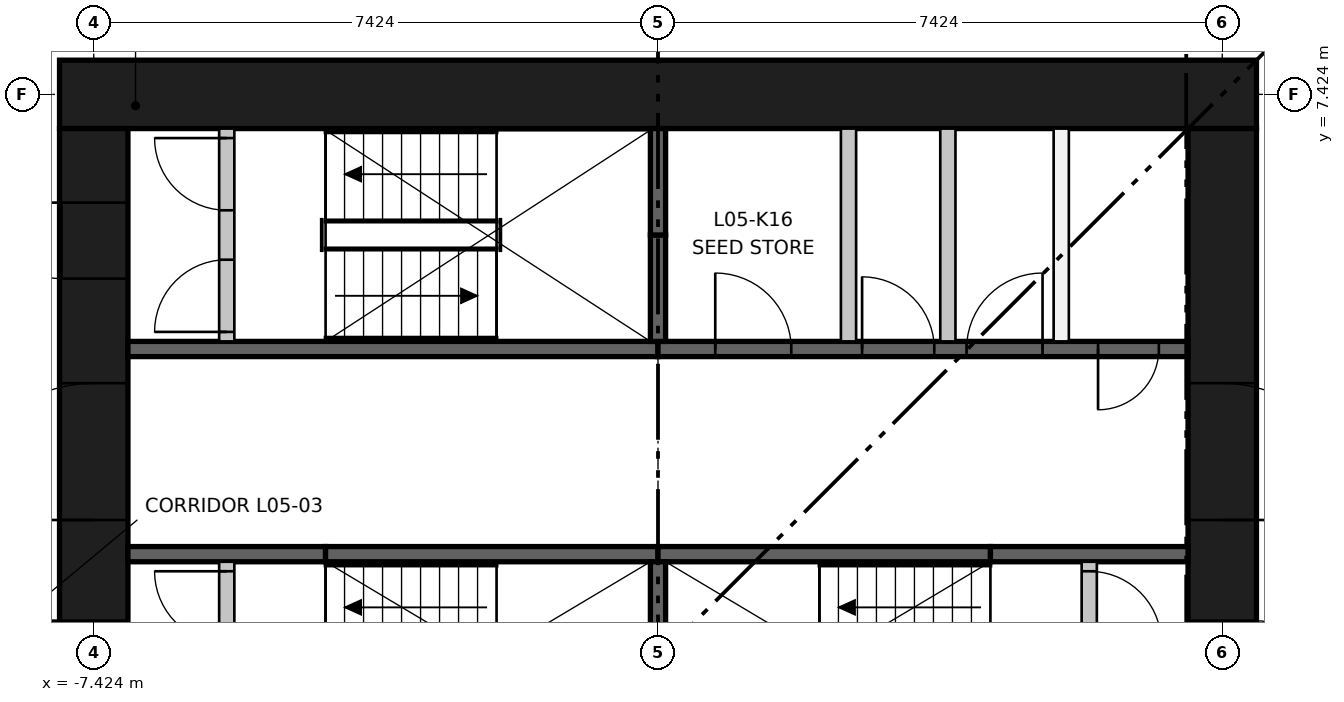
"""IFC4 building model, lengths in metres.
Left out: names, types, materials, properties, quantities, classifications, styles, units other than length and angle.
Written with IfcOpenShell. Run it as: python <this file> out.ifc"""

import sys

from ifc_helpers import new_model, si_unit, direction, frame, frame_2d, origin, place, context, subcontext, project, spatial, rectangle, extrude, element, fill, save


model = new_model("IFC4")
c1 = context("Model", 3, precision=1e-05, world=origin(), true_north=direction((0.0, 1.0)))
c2 = subcontext(c1, "Body", "Model", "MODEL_VIEW")
j1 = project(units=[si_unit("LENGTHUNIT", "METRE"), si_unit("PLANEANGLEUNIT", "RADIAN")], contexts=[c1])
p1 = place(None, origin())
s1 = spatial("IfcSite", under=j1, at=p1, CompositionType="ELEMENT")
p2 = place(p1, origin())
s2 = spatial("IfcBuilding", under=s1, at=p2, CompositionType="ELEMENT")
p3 = place(p2, frame((0.0, 0.0, 22.4)))
s3 = spatial("IfcBuildingStorey", under=s2, at=p3, CompositionType="ELEMENT", Elevation=22.4)
p4 = place(p3, frame((-7.874, 7.424, 0.0), z_axis=(0.0, 0.0, 1.0), x_axis=(1.0, 0.0, 0.0)))
e1 = element("IfcWall", 1, at=p4, inside=s3, PredefinedType="SHEAR", context=c2, shape_type="SweptSolid", body=[
    extrude(rectangle(XDim=15.748, YDim=0.9, at=frame_2d((7.874, 0.0))), origin(), (0.0, 0.0, 1.0), 3.8),
])
p5 = place(p3, frame((-7.424, -6.974, 0.0), z_axis=(0.0, 0.0, 1.0), x_axis=(0.0, 1.0, 0.0)))
e2 = element("IfcWall", 2, at=p5, inside=s3, PredefinedType="SHEAR", context=c2, shape_type="SweptSolid", body=[
    extrude(rectangle(XDim=13.948, YDim=0.9, at=frame_2d((6.974, 0.0))), origin(), (0.0, 0.0, 1.0), 3.8),
])
p6 = place(p5, frame((6.474, 0.0, 0.0)))
e3 = element("IfcOpeningElement", 3, at=p6, cuts=e2, PredefinedType="OPENING", context=c2, shape_type="SweptSolid", body=[
    extrude(rectangle(XDim=1.0, YDim=2.1, at=frame_2d((0.5, 1.05))), frame((0.0, 0.46, 0.0), z_axis=(0.0, -1.0, 0.0), x_axis=(1.0, 0.0, 0.0)), (0.0, 0.0, 1.0), 0.92),
])
p7 = place(p5, frame((3.35, 0.0, 0.0)))
e4 = element("IfcOpeningElement", 4, at=p7, cuts=e2, PredefinedType="OPENING", context=c2, shape_type="SweptSolid", body=[
    extrude(rectangle(XDim=1.8, YDim=2.1, at=frame_2d((0.9, 1.05))), frame((0.0, 0.46, 0.0), z_axis=(0.0, -1.0, 0.0), x_axis=(1.0, 0.0, 0.0)), (0.0, 0.0, 1.0), 0.92),
])
p8 = place(p5, frame((8.799, 0.0, 0.0)))
e5 = element("IfcOpeningElement", 5, at=p8, cuts=e2, PredefinedType="OPENING", context=c2, shape_type="SweptSolid", body=[
    extrude(rectangle(XDim=1.8, YDim=2.1, at=frame_2d((0.9, 1.05))), frame((0.0, 0.46, 0.0), z_axis=(0.0, -1.0, 0.0), x_axis=(1.0, 0.0, 0.0)), (0.0, 0.0, 1.0), 0.92),
])
p9 = place(p5, frame((11.974, 0.0, 0.0)))
e6 = element("IfcOpeningElement", 6, at=p9, cuts=e2, PredefinedType="OPENING", context=c2, shape_type="SweptSolid", body=[
    extrude(rectangle(XDim=1.0, YDim=2.1, at=frame_2d((0.5, 1.05))), frame((0.0, 0.46, 0.0), z_axis=(0.0, -1.0, 0.0), x_axis=(1.0, 0.0, 0.0)), (0.0, 0.0, 1.0), 0.92),
])
p10 = place(p3, frame((7.424, -6.974, 0.0), z_axis=(0.0, 0.0, 1.0), x_axis=(0.0, 1.0, 0.0)))
e7 = element("IfcWall", 7, at=p10, inside=s3, PredefinedType="SHEAR", context=c2, shape_type="SweptSolid", body=[
    extrude(rectangle(XDim=13.948, YDim=0.9, at=frame_2d((6.974, 0.0))), origin(), (0.0, 0.0, 1.0), 3.8),
])
p11 = place(p10, frame((6.474, 0.0, 0.0)))
e8 = element("IfcOpeningElement", 8, at=p11, cuts=e7, PredefinedType="OPENING", context=c2, shape_type="SweptSolid", body=[
    extrude(rectangle(XDim=1.0, YDim=2.1, at=frame_2d((0.5, 1.05))), frame((0.0, 0.46, 0.0), z_axis=(0.0, -1.0, 0.0), x_axis=(1.0, 0.0, 0.0)), (0.0, 0.0, 1.0), 0.92),
])
p12 = place(p10, frame((3.35, 0.0, 0.0)))
e9 = element("IfcOpeningElement", 9, at=p12, cuts=e7, PredefinedType="OPENING", context=c2, shape_type="SweptSolid", body=[
    extrude(rectangle(XDim=1.8, YDim=2.1, at=frame_2d((0.9, 1.05))), frame((0.0, 0.46, 0.0), z_axis=(0.0, -1.0, 0.0), x_axis=(1.0, 0.0, 0.0)), (0.0, 0.0, 1.0), 0.92),
])
p13 = place(p10, frame((8.799, 0.0, 0.0)))
e10 = element("IfcOpeningElement", 10, at=p13, cuts=e7, PredefinedType="OPENING", context=c2, shape_type="SweptSolid", body=[
    extrude(rectangle(XDim=1.8, YDim=2.1, at=frame_2d((0.9, 1.05))), frame((0.0, 0.46, 0.0), z_axis=(0.0, -1.0, 0.0), x_axis=(1.0, 0.0, 0.0)), (0.0, 0.0, 1.0), 0.92),
])
p14 = place(p3, frame((-6.974, 4.074, 0.0), z_axis=(0.0, 0.0, 1.0), x_axis=(1.0, 0.0, 0.0)))
e11 = element("IfcWall", 11, at=p14, inside=s3, PredefinedType="SHEAR", context=c2, shape_type="SweptSolid", body=[
    extrude(rectangle(XDim=6.974, YDim=0.2, at=frame_2d((3.487, 0.0))), origin(), (0.0, 0.0, 1.0), 3.45),
])
p15 = place(p3, frame((0.0, 4.074, 0.0), z_axis=(0.0, 0.0, 1.0), x_axis=(1.0, 0.0, 0.0)))
e12 = element("IfcWall", 12, at=p15, inside=s3, PredefinedType="SHEAR", context=c2, shape_type="SweptSolid", body=[
    extrude(rectangle(XDim=6.974, YDim=0.2, at=frame_2d((3.487, 0.0))), origin(), (0.0, 0.0, 1.0), 3.45),
])
p16 = place(p15, frame((0.753, 0.0, 0.0)))
e13 = element("IfcOpeningElement", 13, at=p16, cuts=e12, PredefinedType="OPENING", context=c2, shape_type="SweptSolid", body=[
    extrude(rectangle(XDim=1.0, YDim=2.1, at=frame_2d((0.5, 1.05))), frame((0.0, 0.11, 0.0), z_axis=(0.0, -1.0, 0.0), x_axis=(1.0, 0.0, 0.0)), (0.0, 0.0, 1.0), 0.22),
])
p17 = place(p15, frame((2.685, 0.0, 0.0)))
e14 = element("IfcOpeningElement", 14, at=p17, cuts=e12, PredefinedType="OPENING", context=c2, shape_type="SweptSolid", body=[
    extrude(rectangle(XDim=0.95, YDim=2.1, at=frame_2d((0.475, 1.05))), frame((0.0, 0.11, 0.0), z_axis=(0.0, -1.0, 0.0), x_axis=(1.0, 0.0, 0.0)), (0.0, 0.0, 1.0), 0.22),
])
p18 = place(p15, frame((4.06, 0.0, 0.0)))
e15 = element("IfcOpeningElement", 15, at=p18, cuts=e12, PredefinedType="OPENING", context=c2, shape_type="SweptSolid", body=[
    extrude(rectangle(XDim=1.0, YDim=2.1, at=frame_2d((0.5, 1.05))), frame((0.0, 0.11, 0.0), z_axis=(0.0, -1.0, 0.0), x_axis=(1.0, 0.0, 0.0)), (0.0, 0.0, 1.0), 0.22),
])
p19 = place(p15, frame((5.79, 0.0, 0.0)))
e16 = element("IfcOpeningElement", 16, at=p19, cuts=e12, PredefinedType="OPENING", context=c2, shape_type="SweptSolid", body=[
    extrude(rectangle(XDim=0.8, YDim=2.1, at=frame_2d((0.4, 1.05))), frame((0.0, 0.11, 0.0), z_axis=(0.0, -1.0, 0.0), x_axis=(1.0, 0.0, 0.0)), (0.0, 0.0, 1.0), 0.22),
])
p20 = place(p3, frame((-6.974, 1.375, 0.0), z_axis=(0.0, 0.0, 1.0), x_axis=(1.0, 0.0, 0.0)))
e17 = element("IfcWall", 17, at=p20, inside=s3, PredefinedType="SHEAR", context=c2, shape_type="SweptSolid", body=[
    extrude(rectangle(XDim=2.6, YDim=0.2, at=frame_2d((1.3, 0.0))), origin(), (0.0, 0.0, 1.0), 3.45),
])
for number, where, z_axis, x_axis in (
    (18, (-4.374, 1.375, 0.0), (0.0, 0.0, 1.0), (1.0, 0.0, 0.0)),
    (19, (0.0, 1.375, 0.0), (0.0, 0.0, 1.0), (1.0, 0.0, 0.0)),
):
    element("IfcWall", number, at=place(p3, frame(where, z_axis=z_axis, x_axis=x_axis)), inside=s3, PredefinedType="SHEAR", context=c2, shape_type="SweptSolid", body=[
        extrude(rectangle(XDim=4.374, YDim=0.2, at=frame_2d((2.187, 0.0))), origin(), (0.0, 0.0, 1.0), 3.45),
    ])
p21 = place(p3, frame((4.374, 1.375, 0.0), z_axis=(0.0, 0.0, 1.0), x_axis=(1.0, 0.0, 0.0)))
e20 = element("IfcWall", 20, at=p21, inside=s3, PredefinedType="SHEAR", context=c2, shape_type="SweptSolid", body=[
    extrude(rectangle(XDim=2.6, YDim=0.2, at=frame_2d((1.3, 0.0))), origin(), (0.0, 0.0, 1.0), 3.45),
])
p22 = place(p3, frame((0.0, -1.275, 0.0), z_axis=(0.0, 0.0, 1.0), x_axis=(0.0, 1.0, 0.0)))
e21 = element("IfcWall", 21, at=p22, inside=s3, PredefinedType="SHEAR", context=c2, shape_type="SweptSolid", body=[
    extrude(rectangle(XDim=2.55, YDim=0.2, at=frame_2d((1.275, 0.0))), origin(), (0.0, 0.0, 1.0), 3.45),
])
p23 = place(p3, frame((0.0, 4.174, 0.0), z_axis=(0.0, 0.0, 1.0), x_axis=(0.0, 1.0, 0.0)))
e22 = element("IfcWall", 22, at=p23, inside=s3, PredefinedType="SHEAR", context=c2, shape_type="SweptSolid", body=[
    extrude(rectangle(XDim=1.4, YDim=0.2, at=frame_2d((0.7, 0.0))), origin(), (0.0, 0.0, 1.0), 3.45),
])
p24 = place(p3, frame((0.0, 5.574, 0.0), z_axis=(0.0, 0.0, 1.0), x_axis=(0.0, 1.0, 0.0)))
e23 = element("IfcWall", 23, at=p24, inside=s3, PredefinedType="SHEAR", context=c2, shape_type="SweptSolid", body=[
    extrude(rectangle(XDim=1.4, YDim=0.2, at=frame_2d((0.7, 0.0))), origin(), (0.0, 0.0, 1.0), 3.45),
])
for number, where, z_axis, x_axis in (
    (24, (2.507, 4.174, 0.0), (0.0, 0.0, 1.0), (0.0, 1.0, 0.0)),
    (25, (3.814, 4.174, 0.0), (0.0, 0.0, 1.0), (0.0, 1.0, 0.0)),
    (26, (5.305, 4.174, 0.0), (0.0, 0.0, 1.0), (0.0, 1.0, 0.0)),
):
    element("IfcWall", number, at=place(p3, frame(where, z_axis=z_axis, x_axis=x_axis)), inside=s3, PredefinedType="PARTITIONING", context=c2, shape_type="SweptSolid", body=[
        extrude(rectangle(XDim=2.8, YDim=0.2, at=frame_2d((1.4, 0.0))), origin(), (0.0, 0.0, 1.0), 3.45),
    ])
p25 = place(p3, frame((-5.674, -1.275, 0.0), z_axis=(0.0, 0.0, 1.0), x_axis=(0.0, 1.0, 0.0)))
e27 = element("IfcWall", 27, at=p25, inside=s3, PredefinedType="PARTITIONING", context=c2, shape_type="SweptSolid", body=[
    extrude(rectangle(XDim=2.55, YDim=0.2, at=frame_2d((1.275, 0.0))), origin(), (0.0, 0.0, 1.0), 3.45),
])
p26 = place(p25, frame((0.125, 0.0, 0.0)))
e28 = element("IfcOpeningElement", 28, at=p26, cuts=e27, PredefinedType="OPENING", context=c2, shape_type="SweptSolid", body=[
    extrude(rectangle(XDim=0.95, YDim=2.1, at=frame_2d((0.475, 1.05))), frame((0.0, 0.11, 0.0), z_axis=(0.0, -1.0, 0.0), x_axis=(1.0, 0.0, 0.0)), (0.0, 0.0, 1.0), 0.22),
])
p27 = place(p25, frame((1.475, 0.0, 0.0)))
e29 = element("IfcOpeningElement", 29, at=p27, cuts=e27, PredefinedType="OPENING", context=c2, shape_type="SweptSolid", body=[
    extrude(rectangle(XDim=0.95, YDim=2.1, at=frame_2d((0.475, 1.05))), frame((0.0, 0.11, 0.0), z_axis=(0.0, -1.0, 0.0), x_axis=(1.0, 0.0, 0.0)), (0.0, 0.0, 1.0), 0.22),
])
p28 = place(p3, frame((5.674, -1.275, 0.0), z_axis=(0.0, 0.0, 1.0), x_axis=(0.0, 1.0, 0.0)))
e30 = element("IfcWall", 30, at=p28, inside=s3, PredefinedType="PARTITIONING", context=c2, shape_type="SweptSolid", body=[
    extrude(rectangle(XDim=2.55, YDim=0.2, at=frame_2d((1.275, 0.0))), origin(), (0.0, 0.0, 1.0), 3.45),
])
p29 = place(p28, frame((0.125, 0.0, 0.0)))
e31 = element("IfcOpeningElement", 31, at=p29, cuts=e30, PredefinedType="OPENING", context=c2, shape_type="SweptSolid", body=[
    extrude(rectangle(XDim=0.95, YDim=2.1, at=frame_2d((0.475, 1.05))), frame((0.0, 0.11, 0.0), z_axis=(0.0, -1.0, 0.0), x_axis=(1.0, 0.0, 0.0)), (0.0, 0.0, 1.0), 0.22),
])
p30 = place(p28, frame((1.475, 0.0, 0.0)))
e32 = element("IfcOpeningElement", 32, at=p30, cuts=e30, PredefinedType="OPENING", context=c2, shape_type="SweptSolid", body=[
    extrude(rectangle(XDim=0.95, YDim=2.1, at=frame_2d((0.475, 1.05))), frame((0.0, 0.11, 0.0), z_axis=(0.0, -1.0, 0.0), x_axis=(1.0, 0.0, 0.0)), (0.0, 0.0, 1.0), 0.22),
])
p31 = place(p3, frame((-5.674, 4.174, 0.0), z_axis=(0.0, 0.0, 1.0), x_axis=(0.0, 1.0, 0.0)))
e33 = element("IfcWall", 33, at=p31, inside=s3, PredefinedType="PARTITIONING", context=c2, shape_type="SweptSolid", body=[
    extrude(rectangle(XDim=2.8, YDim=0.2, at=frame_2d((1.4, 0.0))), origin(), (0.0, 0.0, 1.0), 3.45),
])
p32 = place(p31, frame((0.125, 0.0, 0.0)))
e34 = element("IfcOpeningElement", 34, at=p32, cuts=e33, PredefinedType="OPENING", context=c2, shape_type="SweptSolid", body=[
    extrude(rectangle(XDim=0.95, YDim=2.1, at=frame_2d((0.475, 1.05))), frame((0.0, 0.11, 0.0), z_axis=(0.0, -1.0, 0.0), x_axis=(1.0, 0.0, 0.0)), (0.0, 0.0, 1.0), 0.22),
])
p33 = place(p31, frame((1.725, 0.0, 0.0)))
e35 = element("IfcOpeningElement", 35, at=p33, cuts=e33, PredefinedType="OPENING", context=c2, shape_type="SweptSolid", body=[
    extrude(rectangle(XDim=0.95, YDim=2.1, at=frame_2d((0.475, 1.05))), frame((0.0, 0.11, 0.0), z_axis=(0.0, -1.0, 0.0), x_axis=(1.0, 0.0, 0.0)), (0.0, 0.0, 1.0), 0.22),
])
p34 = place(p27, origin())
e36 = element("IfcDoor", 36, at=p34, inside=s3, OperationType="SINGLE_SWING_RIGHT", PredefinedType="DOOR", context=c2, shape_type="SweptSolid", body=[
    extrude(rectangle(XDim=0.95, YDim=2.1, at=frame_2d((0.475, 1.05))), frame((0.0, 0.025, 0.0), z_axis=(0.0, -1.0, 0.0), x_axis=(1.0, 0.0, 0.0)), (0.0, 0.0, 1.0), 0.05),
])
fill(e29, e36)
p35 = place(p30, frame((0.95, 0.0, 0.0), z_axis=(0.0, 0.0, 1.0), x_axis=(-1.0, 0.0, 0.0)))
e37 = element("IfcDoor", 37, at=p35, inside=s3, OperationType="SINGLE_SWING_LEFT", PredefinedType="DOOR", context=c2, shape_type="SweptSolid", body=[
    extrude(rectangle(XDim=0.95, YDim=2.1, at=frame_2d((0.475, 1.05))), frame((0.0, 0.025, 0.0), z_axis=(0.0, -1.0, 0.0), x_axis=(1.0, 0.0, 0.0)), (0.0, 0.0, 1.0), 0.05),
])
fill(e32, e37)
p36 = place(p32, origin())
e38 = element("IfcDoor", 38, at=p36, inside=s3, OperationType="SINGLE_SWING_LEFT", PredefinedType="DOOR", context=c2, shape_type="SweptSolid", body=[
    extrude(rectangle(XDim=0.95, YDim=2.1, at=frame_2d((0.475, 1.05))), frame((0.0, 0.025, 0.0), z_axis=(0.0, -1.0, 0.0), x_axis=(1.0, 0.0, 0.0)), (0.0, 0.0, 1.0), 0.05),
])
fill(e34, e38)
p37 = place(p33, origin())
e39 = element("IfcDoor", 39, at=p37, inside=s3, OperationType="SINGLE_SWING_RIGHT", PredefinedType="DOOR", context=c2, shape_type="SweptSolid", body=[
    extrude(rectangle(XDim=0.95, YDim=2.1, at=frame_2d((0.475, 1.05))), frame((0.0, 0.025, 0.0), z_axis=(0.0, -1.0, 0.0), x_axis=(1.0, 0.0, 0.0)), (0.0, 0.0, 1.0), 0.05),
])
fill(e35, e39)
p38 = place(p16, origin())
e40 = element("IfcDoor", 40, at=p38, inside=s3, OperationType="SINGLE_SWING_LEFT", PredefinedType="DOOR", context=c2, shape_type="SweptSolid", body=[
    extrude(rectangle(XDim=1.0, YDim=2.1, at=frame_2d((0.5, 1.05))), frame((0.0, 0.025, 0.0), z_axis=(0.0, -1.0, 0.0), x_axis=(1.0, 0.0, 0.0)), (0.0, 0.0, 1.0), 0.05),
])
fill(e13, e40)
p39 = place(p17, origin())
e41 = element("IfcDoor", 41, at=p39, inside=s3, OperationType="SINGLE_SWING_LEFT", PredefinedType="DOOR", context=c2, shape_type="SweptSolid", body=[
    extrude(rectangle(XDim=0.95, YDim=2.1, at=frame_2d((0.475, 1.05))), frame((0.0, 0.025, 0.0), z_axis=(0.0, -1.0, 0.0), x_axis=(1.0, 0.0, 0.0)), (0.0, 0.0, 1.0), 0.05),
])
fill(e14, e41)
p40 = place(p18, origin())
e42 = element("IfcDoor", 42, at=p40, inside=s3, OperationType="SINGLE_SWING_RIGHT", PredefinedType="DOOR", context=c2, shape_type="SweptSolid", body=[
    extrude(rectangle(XDim=1.0, YDim=2.1, at=frame_2d((0.5, 1.05))), frame((0.0, 0.025, 0.0), z_axis=(0.0, -1.0, 0.0), x_axis=(1.0, 0.0, 0.0)), (0.0, 0.0, 1.0), 0.05),
])
fill(e15, e42)
p41 = place(p19, frame((0.8, 0.0, 0.0), z_axis=(0.0, 0.0, 1.0), x_axis=(-1.0, 0.0, 0.0)))
e43 = element("IfcDoor", 43, at=p41, inside=s3, OperationType="SINGLE_SWING_LEFT", PredefinedType="DOOR", context=c2, shape_type="SweptSolid", body=[
    extrude(rectangle(XDim=0.8, YDim=2.1, at=frame_2d((0.4, 1.05))), frame((0.0, 0.025, 0.0), z_axis=(0.0, -1.0, 0.0), x_axis=(1.0, 0.0, 0.0)), (0.0, 0.0, 1.0), 0.05),
])
fill(e16, e43)
p42 = place(p6, origin())
e44 = element("IfcDoor", 44, at=p42, inside=s3, OperationType="SINGLE_SWING_RIGHT", PredefinedType="DOOR", context=c2, shape_type="SweptSolid", body=[
    extrude(rectangle(XDim=1.0, YDim=2.1, at=frame_2d((0.5, 1.05))), frame((0.0, 0.45, 0.0), z_axis=(0.0, -1.0, 0.0), x_axis=(1.0, 0.0, 0.0)), (0.0, 0.0, 1.0), 0.05),
])
fill(e3, e44)
p43 = place(p8, origin())
e45 = element("IfcDoor", 45, at=p43, inside=s3, OperationType="DOUBLE_DOOR_SINGLE_SWING", PredefinedType="DOOR", context=c2, shape_type="SweptSolid", body=[
    extrude(rectangle(XDim=1.8, YDim=2.1, at=frame_2d((0.9, 1.05))), frame((0.0, 0.025, 0.0), z_axis=(0.0, -1.0, 0.0), x_axis=(1.0, 0.0, 0.0)), (0.0, 0.0, 1.0), 0.05),
])
fill(e5, e45)
p44 = place(p9, origin())
e46 = element("IfcDoor", 46, at=p44, inside=s3, OperationType="SINGLE_SWING_RIGHT", PredefinedType="DOOR", context=c2, shape_type="SweptSolid", body=[
    extrude(rectangle(XDim=1.0, YDim=2.1, at=frame_2d((0.5, 1.05))), frame((0.0, 0.45, 0.0), z_axis=(0.0, -1.0, 0.0), x_axis=(1.0, 0.0, 0.0)), (0.0, 0.0, 1.0), 0.05),
])
fill(e6, e46)
p45 = place(p11, frame((1.0, 0.0, 0.0), z_axis=(0.0, 0.0, 1.0), x_axis=(-1.0, 0.0, 0.0)))
e47 = element("IfcDoor", 47, at=p45, inside=s3, OperationType="SINGLE_SWING_LEFT", PredefinedType="DOOR", context=c2, shape_type="SweptSolid", body=[
    extrude(rectangle(XDim=1.0, YDim=2.1, at=frame_2d((0.5, 1.05))), frame((0.0, 0.45, 0.0), z_axis=(0.0, -1.0, 0.0), x_axis=(1.0, 0.0, 0.0)), (0.0, 0.0, 1.0), 0.05),
])
fill(e8, e47)
p46 = place(p13, frame((1.8, 0.0, 0.0), z_axis=(0.0, 0.0, 1.0), x_axis=(-1.0, 0.0, 0.0)))
e48 = element("IfcDoor", 48, at=p46, inside=s3, OperationType="DOUBLE_DOOR_SINGLE_SWING", PredefinedType="DOOR", context=c2, shape_type="SweptSolid", body=[
    extrude(rectangle(XDim=1.8, YDim=2.1, at=frame_2d((0.9, 1.05))), frame((0.0, 0.025, 0.0), z_axis=(0.0, -1.0, 0.0), x_axis=(1.0, 0.0, 0.0)), (0.0, 0.0, 1.0), 0.05),
])
fill(e10, e48)
save(model, sys.argv[1])
